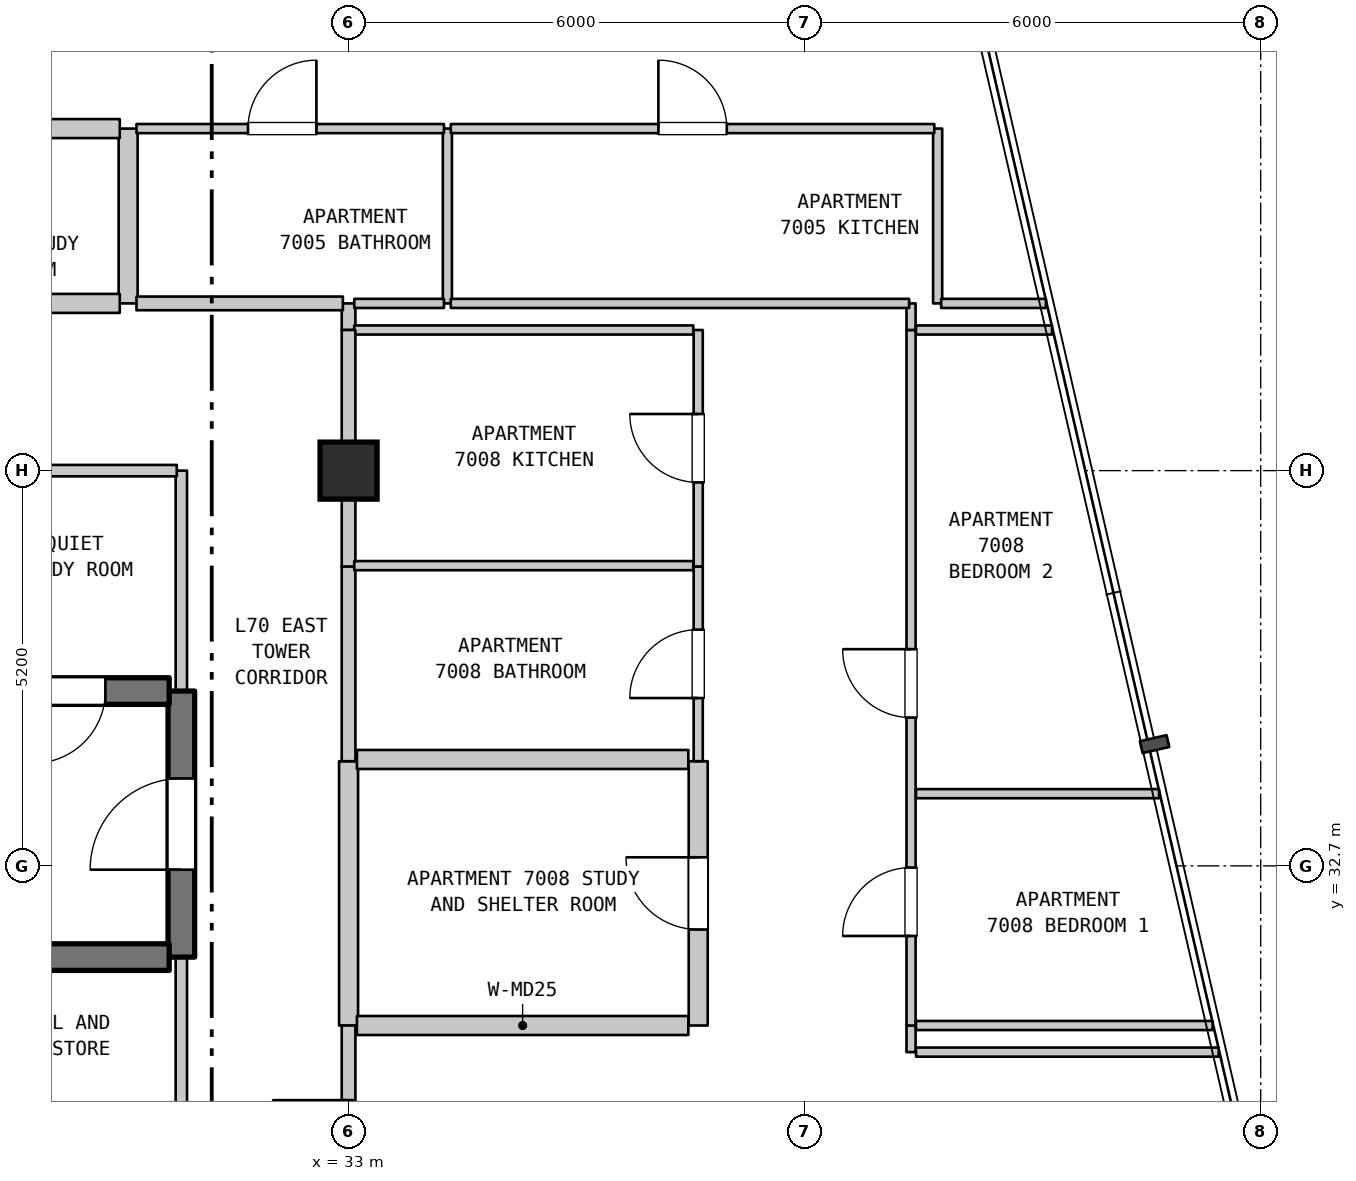
"""IFC4 building model, lengths in metres.
Left out: names, types, materials, properties, quantities, classifications, styles, units other than length and angle.
Written with IfcOpenShell. Run it as: python <this file> out.ifc"""

import sys

from ifc_helpers import new_model, si_unit, direction, frame, frame_2d, origin, origin_2d, place, context, subcontext, project, spatial, rectangle, extrude, element, fill, save


model = new_model("IFC4")
c1 = context("Model", 3, precision=1e-05, world=origin(), true_north=direction((0.0, 1.0)))
c2 = subcontext(c1, "Body", "Model", "MODEL_VIEW")
j1 = project(units=[si_unit("LENGTHUNIT", "METRE"), si_unit("PLANEANGLEUNIT", "RADIAN")], contexts=[c1])
p1 = place(None, origin())
s1 = spatial("IfcSite", under=j1, at=p1, CompositionType="ELEMENT")
p2 = place(p1, origin())
s2 = spatial("IfcBuilding", under=s1, at=p2, CompositionType="ELEMENT")
p3 = place(p2, frame((0.0, 0.0, 280.6)))
s3 = spatial("IfcBuildingStorey", under=s2, at=p3, CompositionType="ELEMENT", Elevation=280.6)
p4 = place(p3, frame((33.0, 37.9, 0.0), z_axis=(0.0, 0.0, 1.0), x_axis=(1.0, 0.0, 0.0)))
e1 = element("IfcColumn", 1, at=p4, inside=s3, PredefinedType="COLUMN", context=c2, shape_type="SweptSolid", body=[
    extrude(rectangle(XDim=0.75, YDim=0.75, at=origin_2d()), origin(), (0.0, 0.0, 1.0), 3.7),
])
p5 = place(p3, frame((30.1, 40.1, 0.0), z_axis=(0.0, 0.0, 1.0), x_axis=(0.0, 1.0, 0.0)))
e2 = element("IfcWall", 2, at=p5, inside=s3, PredefinedType="STANDARD", context=c2, shape_type="SweptSolid", body=[
    extrude(rectangle(XDim=2.3, YDim=0.25, at=frame_2d((1.15, 0.0))), origin(), (0.0, 0.0, 1.0), 3.39),
])
p6 = place(p3, frame((30.8, 28.9, 0.0), z_axis=(0.0, 0.0, 1.0), x_axis=(0.0, 1.0, 0.0)))
e3 = element("IfcWall", 3, at=p6, inside=s3, PredefinedType="STANDARD", context=c2, shape_type="SweptSolid", body=[
    extrude(rectangle(XDim=2.6, YDim=0.15, at=frame_2d((1.3, 0.0))), origin(), (0.0, 0.0, 1.0), 3.39),
])
p7 = place(p3, frame((30.8, 31.5, 0.0), z_axis=(0.0, 0.0, 1.0), x_axis=(0.0, 1.0, 0.0)))
e4 = element("IfcWall", 4, at=p7, inside=s3, PredefinedType="SHEAR", context=c2, shape_type="SweptSolid", body=[
    extrude(rectangle(XDim=3.5, YDim=0.35, at=frame_2d((1.75, 0.0))), origin(), (0.0, 0.0, 1.0), 3.39),
])
p8 = place(p7, frame((1.15, 0.0, 0.0)))
e5 = element("IfcOpeningElement", 5, at=p8, cuts=e4, PredefinedType="OPENING", context=c2, shape_type="SweptSolid", body=[
    extrude(rectangle(XDim=1.2, YDim=2.2, at=frame_2d((0.6, 1.1))), frame((0.0, 0.185, 0.0), z_axis=(0.0, -1.0, 0.0), x_axis=(1.0, 0.0, 0.0)), (0.0, 0.0, 1.0), 0.37),
])
p9 = place(p3, frame((30.8, 35.0, 0.0), z_axis=(0.0, 0.0, 1.0), x_axis=(0.0, 1.0, 0.0)))
e6 = element("IfcWall", 6, at=p9, inside=s3, PredefinedType="STANDARD", context=c2, shape_type="SweptSolid", body=[
    extrude(rectangle(XDim=2.9, YDim=0.15, at=frame_2d((1.45, 0.0))), origin(), (0.0, 0.0, 1.0), 3.39),
])
p10 = place(p3, frame((33.0, 30.6, 0.0), z_axis=(0.0, 0.0, 1.0), x_axis=(0.0, 1.0, 0.0)))
e7 = element("IfcWall", 7, at=p10, inside=s3, PredefinedType="STANDARD", context=c2, shape_type="SweptSolid", body=[
    extrude(rectangle(XDim=3.477, YDim=0.25, at=frame_2d((1.738, 0.0))), origin(), (0.0, 0.0, 1.0), 2.89),
])
p11 = place(p3, frame((33.0, 34.077, 0.0), z_axis=(0.0, 0.0, 1.0), x_axis=(0.0, 1.0, 0.0)))
e8 = element("IfcWall", 8, at=p11, inside=s3, PredefinedType="STANDARD", context=c2, shape_type="SweptSolid", body=[
    extrude(rectangle(XDim=2.562, YDim=0.18, at=frame_2d((1.281, 0.0))), origin(), (0.0, 0.0, 1.0), 2.89),
])
p12 = place(p3, frame((33.0, 36.639, 0.0), z_axis=(0.0, 0.0, 1.0), x_axis=(0.0, 1.0, 0.0)))
e9 = element("IfcWall", 9, at=p12, inside=s3, PredefinedType="STANDARD", context=c2, shape_type="SweptSolid", body=[
    extrude(rectangle(XDim=1.261, YDim=0.18, at=frame_2d((0.63, 0.0))), origin(), (0.0, 0.0, 1.0), 2.89),
])
p13 = place(p3, frame((33.0, 39.75, 0.0), z_axis=(0.0, 0.0, 1.0), x_axis=(0.0, 1.0, 0.0)))
e10 = element("IfcWall", 10, at=p13, inside=s3, PredefinedType="STANDARD", context=c2, shape_type="SweptSolid", body=[
    extrude(rectangle(XDim=0.35, YDim=0.18, at=frame_2d((0.175, 0.0))), origin(), (0.0, 0.0, 1.0), 3.39),
])
p14 = place(p3, frame((34.3, 40.1, 0.0), z_axis=(0.0, 0.0, 1.0), x_axis=(0.0, 1.0, 0.0)))
e11 = element("IfcWall", 11, at=p14, inside=s3, PredefinedType="PARTITIONING", context=c2, shape_type="SweptSolid", body=[
    extrude(rectangle(XDim=2.3, YDim=0.12, at=frame_2d((1.15, 0.0))), origin(), (0.0, 0.0, 1.0), 3.39),
])
p15 = place(p3, frame((37.6, 30.6, 0.0), z_axis=(0.0, 0.0, 1.0), x_axis=(0.0, 1.0, 0.0)))
e12 = element("IfcWall", 12, at=p15, inside=s3, PredefinedType="STANDARD", context=c2, shape_type="SweptSolid", body=[
    extrude(rectangle(XDim=3.477, YDim=0.25, at=frame_2d((1.738, 0.0))), origin(), (0.0, 0.0, 1.0), 3.39),
])
p16 = place(p15, frame((1.263, 0.0, 0.0)))
e13 = element("IfcOpeningElement", 13, at=p16, cuts=e12, PredefinedType="OPENING", context=c2, shape_type="SweptSolid", body=[
    extrude(rectangle(XDim=0.95, YDim=2.15, at=frame_2d((0.475, 1.075))), frame((0.0, 0.135, 0.0), z_axis=(0.0, -1.0, 0.0), x_axis=(1.0, 0.0, 0.0)), (0.0, 0.0, 1.0), 0.27),
])
p17 = place(p3, frame((37.6, 34.077, 0.0), z_axis=(0.0, 0.0, 1.0), x_axis=(0.0, 1.0, 0.0)))
e14 = element("IfcWall", 14, at=p17, inside=s3, PredefinedType="PARTITIONING", context=c2, shape_type="SweptSolid", body=[
    extrude(rectangle(XDim=2.562, YDim=0.12, at=frame_2d((1.281, 0.0))), origin(), (0.0, 0.0, 1.0), 3.39),
])
p18 = place(p17, frame((0.831, 0.0, 0.0)))
e15 = element("IfcOpeningElement", 15, at=p18, cuts=e14, PredefinedType="OPENING", context=c2, shape_type="SweptSolid", body=[
    extrude(rectangle(XDim=0.9, YDim=2.1, at=frame_2d((0.45, 1.05))), frame((0.0, 0.07, 0.0), z_axis=(0.0, -1.0, 0.0), x_axis=(1.0, 0.0, 0.0)), (0.0, 0.0, 1.0), 0.14),
])
p19 = place(p3, frame((37.6, 36.639, 0.0), z_axis=(0.0, 0.0, 1.0), x_axis=(0.0, 1.0, 0.0)))
e16 = element("IfcWall", 16, at=p19, inside=s3, PredefinedType="PARTITIONING", context=c2, shape_type="SweptSolid", body=[
    extrude(rectangle(XDim=3.111, YDim=0.12, at=frame_2d((1.556, 0.0))), origin(), (0.0, 0.0, 1.0), 3.39),
])
p20 = place(p19, frame((1.106, 0.0, 0.0)))
e17 = element("IfcOpeningElement", 17, at=p20, cuts=e16, PredefinedType="OPENING", context=c2, shape_type="SweptSolid", body=[
    extrude(rectangle(XDim=0.9, YDim=2.15, at=frame_2d((0.45, 1.075))), frame((0.0, 0.07, 0.0), z_axis=(0.0, -1.0, 0.0), x_axis=(1.0, 0.0, 0.0)), (0.0, 0.0, 1.0), 0.14),
])
p21 = place(p3, frame((40.4, 30.25, 0.0), z_axis=(0.0, 0.0, 1.0), x_axis=(0.0, 1.0, 0.0)))
e18 = element("IfcWall", 18, at=p21, inside=s3, PredefinedType="PARTITIONING", context=c2, shape_type="SweptSolid", body=[
    extrude(rectangle(XDim=0.35, YDim=0.12, at=frame_2d((0.175, 0.0))), origin(), (0.0, 0.0, 1.0), 3.39),
])
p22 = place(p3, frame((40.4, 30.6, 0.0), z_axis=(0.0, 0.0, 1.0), x_axis=(0.0, 1.0, 0.0)))
e19 = element("IfcWall", 19, at=p22, inside=s3, PredefinedType="PARTITIONING", context=c2, shape_type="SweptSolid", body=[
    extrude(rectangle(XDim=9.15, YDim=0.12, at=frame_2d((4.575, 0.0))), origin(), (0.0, 0.0, 1.0), 3.39),
])
p23 = place(p22, frame((1.178, 0.0, 0.0)))
e20 = element("IfcOpeningElement", 20, at=p23, cuts=e19, PredefinedType="OPENING", context=c2, shape_type="SweptSolid", body=[
    extrude(rectangle(XDim=0.9, YDim=2.15, at=frame_2d((0.45, 1.075))), frame((0.0, 0.07, 0.0), z_axis=(0.0, -1.0, 0.0), x_axis=(1.0, 0.0, 0.0)), (0.0, 0.0, 1.0), 0.14),
])
p24 = place(p22, frame((4.051, 0.0, 0.0)))
e21 = element("IfcOpeningElement", 21, at=p24, cuts=e19, PredefinedType="OPENING", context=c2, shape_type="SweptSolid", body=[
    extrude(rectangle(XDim=0.9, YDim=2.15, at=frame_2d((0.45, 1.075))), frame((0.0, 0.07, 0.0), z_axis=(0.0, -1.0, 0.0), x_axis=(1.0, 0.0, 0.0)), (0.0, 0.0, 1.0), 0.14),
])
p25 = place(p3, frame((40.4, 39.75, 0.0), z_axis=(0.0, 0.0, 1.0), x_axis=(0.0, 1.0, 0.0)))
e22 = element("IfcWall", 22, at=p25, inside=s3, PredefinedType="PARTITIONING", context=c2, shape_type="SweptSolid", body=[
    extrude(rectangle(XDim=0.35, YDim=0.12, at=frame_2d((0.175, 0.0))), origin(), (0.0, 0.0, 1.0), 3.39),
])
p26 = place(p3, frame((40.75, 40.1, 0.0), z_axis=(0.0, 0.0, 1.0), x_axis=(0.0, 1.0, 0.0)))
e23 = element("IfcWall", 23, at=p26, inside=s3, PredefinedType="PARTITIONING", context=c2, shape_type="SweptSolid", body=[
    extrude(rectangle(XDim=2.3, YDim=0.12, at=frame_2d((1.15, 0.0))), origin(), (0.0, 0.0, 1.0), 3.39),
])
p27 = place(p3, frame((40.465, 30.25, 0.0), z_axis=(0.0, 0.0, 1.0), x_axis=(1.0, 0.0, 0.0)))
e24 = element("IfcWall", 24, at=p27, inside=s3, PredefinedType="PARTITIONING", context=c2, shape_type="SweptSolid", body=[
    extrude(rectangle(XDim=3.982, YDim=0.12, at=frame_2d((1.991, 0.0))), origin(), (0.0, 0.0, 1.0), 3.39),
])
p28 = place(p3, frame((33.11, 30.6, 0.0), z_axis=(0.0, 0.0, 1.0), x_axis=(1.0, 0.0, 0.0)))
e25 = element("IfcWall", 25, at=p28, inside=s3, PredefinedType="STANDARD", context=c2, shape_type="SweptSolid", body=[
    extrude(rectangle(XDim=4.36, YDim=0.25, at=frame_2d((2.18, 0.0))), origin(), (0.0, 0.0, 1.0), 3.39),
])
p29 = place(p3, frame((40.465, 30.6, 0.0), z_axis=(0.0, 0.0, 1.0), x_axis=(1.0, 0.0, 0.0)))
e26 = element("IfcWall", 26, at=p29, inside=s3, PredefinedType="PARTITIONING", context=c2, shape_type="SweptSolid", body=[
    extrude(rectangle(XDim=3.902, YDim=0.12, at=frame_2d((1.951, 0.0))), origin(), (0.0, 0.0, 1.0), 3.39),
])
p30 = place(p3, frame((27.46, 31.5, 0.0), z_axis=(0.0, 0.0, 1.0), x_axis=(1.0, 0.0, 0.0)))
e27 = element("IfcWall", 27, at=p30, inside=s3, PredefinedType="SHEAR", context=c2, shape_type="SweptSolid", body=[
    extrude(rectangle(XDim=3.18, YDim=0.35, at=frame_2d((1.59, 0.0))), origin(), (0.0, 0.0, 1.0), 3.39),
])
p31 = place(p3, frame((40.465, 33.65, 0.0), z_axis=(0.0, 0.0, 1.0), x_axis=(1.0, 0.0, 0.0)))
e28 = element("IfcWall", 28, at=p31, inside=s3, PredefinedType="PARTITIONING", context=c2, shape_type="SweptSolid", body=[
    extrude(rectangle(XDim=3.198, YDim=0.12, at=frame_2d((1.599, 0.0))), origin(), (0.0, 0.0, 1.0), 3.39),
])
p32 = place(p3, frame((33.11, 34.1, 0.0), z_axis=(0.0, 0.0, 1.0), x_axis=(1.0, 0.0, 0.0)))
e29 = element("IfcWall", 29, at=p32, inside=s3, PredefinedType="STANDARD", context=c2, shape_type="SweptSolid", body=[
    extrude(rectangle(XDim=4.36, YDim=0.25, at=frame_2d((2.18, 0.0))), origin(), (0.0, 0.0, 1.0), 3.39),
])
p33 = place(p3, frame((28.045, 35.0, 0.0), z_axis=(0.0, 0.0, 1.0), x_axis=(1.0, 0.0, 0.0)))
e30 = element("IfcWall", 30, at=p33, inside=s3, PredefinedType="SHEAR", context=c2, shape_type="SweptSolid", body=[
    extrude(rectangle(XDim=2.595, YDim=0.35, at=frame_2d((1.297, 0.0))), origin(), (0.0, 0.0, 1.0), 3.39),
])
p34 = place(p33, frame((0.806, 0.0, 0.0)))
e31 = element("IfcOpeningElement", 31, at=p34, cuts=e30, PredefinedType="OPENING", context=c2, shape_type="SweptSolid", body=[
    extrude(rectangle(XDim=0.95, YDim=2.15, at=frame_2d((0.475, 1.075))), frame((0.0, 0.185, 0.0), z_axis=(0.0, -1.0, 0.0), x_axis=(1.0, 0.0, 0.0)), (0.0, 0.0, 1.0), 0.37),
])
p35 = place(p3, frame((33.075, 36.65, 0.0), z_axis=(0.0, 0.0, 1.0), x_axis=(1.0, 0.0, 0.0)))
e32 = element("IfcWall", 32, at=p35, inside=s3, PredefinedType="PARTITIONING", context=c2, shape_type="SweptSolid", body=[
    extrude(rectangle(XDim=4.46, YDim=0.12, at=frame_2d((2.23, 0.0))), origin(), (0.0, 0.0, 1.0), 3.39),
])
p36 = place(p3, frame((28.045, 37.9, 0.0), z_axis=(0.0, 0.0, 1.0), x_axis=(1.0, 0.0, 0.0)))
e33 = element("IfcWall", 33, at=p36, inside=s3, PredefinedType="STANDARD", context=c2, shape_type="SweptSolid", body=[
    extrude(rectangle(XDim=2.695, YDim=0.15, at=frame_2d((1.348, 0.0))), origin(), (0.0, 0.0, 1.0), 2.89),
])
p37 = place(p3, frame((33.075, 39.75, 0.0), z_axis=(0.0, 0.0, 1.0), x_axis=(1.0, 0.0, 0.0)))
e34 = element("IfcWall", 34, at=p37, inside=s3, PredefinedType="PARTITIONING", context=c2, shape_type="SweptSolid", body=[
    extrude(rectangle(XDim=4.46, YDim=0.12, at=frame_2d((2.23, 0.0))), origin(), (0.0, 0.0, 1.0), 3.39),
])
p38 = place(p3, frame((40.465, 39.75, 0.0), z_axis=(0.0, 0.0, 1.0), x_axis=(1.0, 0.0, 0.0)))
e35 = element("IfcWall", 35, at=p38, inside=s3, PredefinedType="PARTITIONING", context=c2, shape_type="SweptSolid", body=[
    extrude(rectangle(XDim=1.79, YDim=0.12, at=frame_2d((0.895, 0.0))), origin(), (0.0, 0.0, 1.0), 3.39),
])
p39 = place(p3, frame((25.86, 40.1, 0.0), z_axis=(0.0, 0.0, 1.0), x_axis=(1.0, 0.0, 0.0)))
e36 = element("IfcWall", 36, at=p39, inside=s3, PredefinedType="STANDARD", context=c2, shape_type="SweptSolid", body=[
    extrude(rectangle(XDim=4.13, YDim=0.25, at=frame_2d((2.065, 0.0))), origin(), (0.0, 0.0, 1.0), 3.39),
])
p40 = place(p3, frame((30.21, 40.1, 0.0), z_axis=(0.0, 0.0, 1.0), x_axis=(1.0, 0.0, 0.0)))
e37 = element("IfcWall", 37, at=p40, inside=s3, PredefinedType="STANDARD", context=c2, shape_type="SweptSolid", body=[
    extrude(rectangle(XDim=2.715, YDim=0.18, at=frame_2d((1.357, 0.0))), origin(), (0.0, 0.0, 1.0), 3.39),
])
p41 = place(p3, frame((33.075, 40.1, 0.0), z_axis=(0.0, 0.0, 1.0), x_axis=(1.0, 0.0, 0.0)))
e38 = element("IfcWall", 38, at=p41, inside=s3, PredefinedType="PARTITIONING", context=c2, shape_type="SweptSolid", body=[
    extrude(rectangle(XDim=1.18, YDim=0.12, at=frame_2d((0.59, 0.0))), origin(), (0.0, 0.0, 1.0), 3.39),
])
p42 = place(p3, frame((34.345, 40.1, 0.0), z_axis=(0.0, 0.0, 1.0), x_axis=(1.0, 0.0, 0.0)))
e39 = element("IfcWall", 39, at=p42, inside=s3, PredefinedType="PARTITIONING", context=c2, shape_type="SweptSolid", body=[
    extrude(rectangle(XDim=6.03, YDim=0.12, at=frame_2d((3.015, 0.0))), origin(), (0.0, 0.0, 1.0), 3.39),
])
p43 = place(p3, frame((40.796, 40.1, 0.0), z_axis=(0.0, 0.0, 1.0), x_axis=(1.0, 0.0, 0.0)))
e40 = element("IfcWall", 40, at=p43, inside=s3, PredefinedType="PARTITIONING", context=c2, shape_type="SweptSolid", body=[
    extrude(rectangle(XDim=1.379, YDim=0.12, at=frame_2d((0.689, 0.0))), origin(), (0.0, 0.0, 1.0), 3.39),
])
p44 = place(p3, frame((25.86, 42.4, 0.0), z_axis=(0.0, 0.0, 1.0), x_axis=(1.0, 0.0, 0.0)))
e41 = element("IfcWall", 41, at=p44, inside=s3, PredefinedType="STANDARD", context=c2, shape_type="SweptSolid", body=[
    extrude(rectangle(XDim=4.13, YDim=0.25, at=frame_2d((2.065, 0.0))), origin(), (0.0, 0.0, 1.0), 3.39),
])
p45 = place(p44, frame((1.59, 0.0, 0.0)))
e42 = element("IfcOpeningElement", 42, at=p45, cuts=e41, PredefinedType="OPENING", context=c2, shape_type="SweptSolid", body=[
    extrude(rectangle(XDim=0.95, YDim=2.15, at=frame_2d((0.475, 1.075))), frame((0.0, 0.135, 0.0), z_axis=(0.0, -1.0, 0.0), x_axis=(1.0, 0.0, 0.0)), (0.0, 0.0, 1.0), 0.27),
])
p46 = place(p3, frame((30.21, 42.4, 0.0), z_axis=(0.0, 0.0, 1.0), x_axis=(1.0, 0.0, 0.0)))
e43 = element("IfcWall", 43, at=p46, inside=s3, PredefinedType="PARTITIONING", context=c2, shape_type="SweptSolid", body=[
    extrude(rectangle(XDim=4.045, YDim=0.12, at=frame_2d((2.022, 0.0))), origin(), (0.0, 0.0, 1.0), 3.39),
])
p47 = place(p46, frame((1.467, 0.0, 0.0)))
e44 = element("IfcOpeningElement", 44, at=p47, cuts=e43, PredefinedType="OPENING", context=c2, shape_type="SweptSolid", body=[
    extrude(rectangle(XDim=0.9, YDim=2.1, at=frame_2d((0.45, 1.05))), frame((0.0, 0.07, 0.0), z_axis=(0.0, -1.0, 0.0), x_axis=(1.0, 0.0, 0.0)), (0.0, 0.0, 1.0), 0.14),
])
p48 = place(p3, frame((34.345, 42.4, 0.0), z_axis=(0.0, 0.0, 1.0), x_axis=(1.0, 0.0, 0.0)))
e45 = element("IfcWall", 45, at=p48, inside=s3, PredefinedType="PARTITIONING", context=c2, shape_type="SweptSolid", body=[
    extrude(rectangle(XDim=6.361, YDim=0.12, at=frame_2d((3.181, 0.0))), origin(), (0.0, 0.0, 1.0), 3.39),
])
p49 = place(p48, frame((2.731, 0.0, 0.0)))
e46 = element("IfcOpeningElement", 46, at=p49, cuts=e45, PredefinedType="OPENING", context=c2, shape_type="SweptSolid", body=[
    extrude(rectangle(XDim=0.9, YDim=2.15, at=frame_2d((0.45, 1.075))), frame((0.0, 0.07, 0.0), z_axis=(0.0, -1.0, 0.0), x_axis=(1.0, 0.0, 0.0)), (0.0, 0.0, 1.0), 0.14),
])
p50 = place(p3, frame((33.0, 27.9, 0.0), z_axis=(0.0, 0.0, 1.0), x_axis=(0.0, 1.0, 0.0)))
e47 = element("IfcWall", 47, at=p50, inside=s3, PredefinedType="STANDARD", context=c2, shape_type="SweptSolid", body=[
    extrude(rectangle(XDim=2.7, YDim=0.18, at=frame_2d((1.35, 0.0))), origin(), (0.0, 0.0, 1.0), 2.89),
])
p51 = place(p50, frame((0.718, 0.0, 0.0)))
e48 = element("IfcOpeningElement", 48, at=p51, cuts=e47, PredefinedType="OPENING", context=c2, shape_type="SweptSolid", body=[
    extrude(rectangle(XDim=1.0, YDim=2.15, at=frame_2d((0.5, 1.075))), frame((0.0, 0.1, 0.0), z_axis=(0.0, -1.0, 0.0), x_axis=(1.0, 0.0, 0.0)), (0.0, 0.0, 1.0), 0.2),
])
p52 = place(p3, frame((33.0, 37.9, 0.0), z_axis=(0.0, 0.0, 1.0), x_axis=(0.0, 1.0, 0.0)))
e49 = element("IfcWall", 49, at=p52, inside=s3, PredefinedType="STANDARD", context=c2, shape_type="SweptSolid", body=[
    extrude(rectangle(XDim=1.85, YDim=0.18, at=frame_2d((0.925, 0.0))), origin(), (0.0, 0.0, 1.0), 2.79),
])
p53 = place(p8, origin())
e50 = element("IfcDoor", 50, at=p53, inside=s3, OperationType="SINGLE_SWING_LEFT", PredefinedType="DOOR", context=c2, shape_type="SweptSolid", body=[
    extrude(rectangle(XDim=1.2, YDim=2.2, at=frame_2d((0.6, 1.1))), frame((0.0, 0.025, 0.0), z_axis=(0.0, -1.0, 0.0), x_axis=(1.0, 0.0, 0.0)), (0.0, 0.0, 1.0), 0.05),
])
fill(e5, e50)
p54 = place(p51, origin())
e51 = element("IfcDoor", 51, at=p54, inside=s3, OperationType="SINGLE_SWING_RIGHT", PredefinedType="DOOR", context=c2, shape_type="SweptSolid", body=[
    extrude(rectangle(XDim=1.0, YDim=2.15, at=frame_2d((0.5, 1.075))), frame((0.0, 0.025, 0.0), z_axis=(0.0, -1.0, 0.0), x_axis=(1.0, 0.0, 0.0)), (0.0, 0.0, 1.0), 0.05),
])
fill(e48, e51)
p55 = place(p16, origin())
e52 = element("IfcDoor", 52, at=p55, inside=s3, OperationType="SINGLE_SWING_RIGHT", PredefinedType="DOOR", context=c2, shape_type="SweptSolid", body=[
    extrude(rectangle(XDim=0.95, YDim=2.15, at=frame_2d((0.475, 1.075))), frame((0.0, 0.025, 0.0), z_axis=(0.0, -1.0, 0.0), x_axis=(1.0, 0.0, 0.0)), (0.0, 0.0, 1.0), 0.05),
])
fill(e13, e52)
p56 = place(p18, origin())
e53 = element("IfcDoor", 53, at=p56, inside=s3, OperationType="SINGLE_SWING_LEFT", PredefinedType="DOOR", context=c2, shape_type="SweptSolid", body=[
    extrude(rectangle(XDim=0.9, YDim=2.1, at=frame_2d((0.45, 1.05))), frame((0.0, 0.025, 0.0), z_axis=(0.0, -1.0, 0.0), x_axis=(1.0, 0.0, 0.0)), (0.0, 0.0, 1.0), 0.05),
])
fill(e15, e53)
p57 = place(p20, origin())
e54 = element("IfcDoor", 54, at=p57, inside=s3, OperationType="SINGLE_SWING_RIGHT", PredefinedType="DOOR", context=c2, shape_type="SweptSolid", body=[
    extrude(rectangle(XDim=0.9, YDim=2.15, at=frame_2d((0.45, 1.075))), frame((0.0, 0.025, 0.0), z_axis=(0.0, -1.0, 0.0), x_axis=(1.0, 0.0, 0.0)), (0.0, 0.0, 1.0), 0.05),
])
fill(e17, e54)
p58 = place(p23, origin())
e55 = element("IfcDoor", 55, at=p58, inside=s3, OperationType="SINGLE_SWING_LEFT", PredefinedType="DOOR", context=c2, shape_type="SweptSolid", body=[
    extrude(rectangle(XDim=0.9, YDim=2.15, at=frame_2d((0.45, 1.075))), frame((0.0, 0.025, 0.0), z_axis=(0.0, -1.0, 0.0), x_axis=(1.0, 0.0, 0.0)), (0.0, 0.0, 1.0), 0.05),
])
fill(e20, e55)
p59 = place(p24, origin())
e56 = element("IfcDoor", 56, at=p59, inside=s3, OperationType="SINGLE_SWING_RIGHT", PredefinedType="DOOR", context=c2, shape_type="SweptSolid", body=[
    extrude(rectangle(XDim=0.9, YDim=2.15, at=frame_2d((0.45, 1.075))), frame((0.0, 0.025, 0.0), z_axis=(0.0, -1.0, 0.0), x_axis=(1.0, 0.0, 0.0)), (0.0, 0.0, 1.0), 0.05),
])
fill(e21, e56)
p60 = place(p34, frame((0.95, 0.0, 0.0), z_axis=(0.0, 0.0, 1.0), x_axis=(-1.0, 0.0, 0.0)))
e57 = element("IfcDoor", 57, at=p60, inside=s3, OperationType="SINGLE_SWING_LEFT", PredefinedType="DOOR", context=c2, shape_type="SweptSolid", body=[
    extrude(rectangle(XDim=0.95, YDim=2.15, at=frame_2d((0.475, 1.075))), frame((0.0, 0.025, 0.0), z_axis=(0.0, -1.0, 0.0), x_axis=(1.0, 0.0, 0.0)), (0.0, 0.0, 1.0), 0.05),
])
fill(e31, e57)
p61 = place(p47, origin())
e58 = element("IfcDoor", 58, at=p61, inside=s3, OperationType="SINGLE_SWING_RIGHT", PredefinedType="DOOR", context=c2, shape_type="SweptSolid", body=[
    extrude(rectangle(XDim=0.9, YDim=2.1, at=frame_2d((0.45, 1.05))), frame((0.0, 0.025, 0.0), z_axis=(0.0, -1.0, 0.0), x_axis=(1.0, 0.0, 0.0)), (0.0, 0.0, 1.0), 0.05),
])
fill(e44, e58)
p62 = place(p49, origin())
e59 = element("IfcDoor", 59, at=p62, inside=s3, OperationType="SINGLE_SWING_LEFT", PredefinedType="DOOR", context=c2, shape_type="SweptSolid", body=[
    extrude(rectangle(XDim=0.9, YDim=2.15, at=frame_2d((0.45, 1.075))), frame((0.0, 0.025, 0.0), z_axis=(0.0, -1.0, 0.0), x_axis=(1.0, 0.0, 0.0)), (0.0, 0.0, 1.0), 0.05),
])
fill(e46, e59)
save(model, sys.argv[1])
